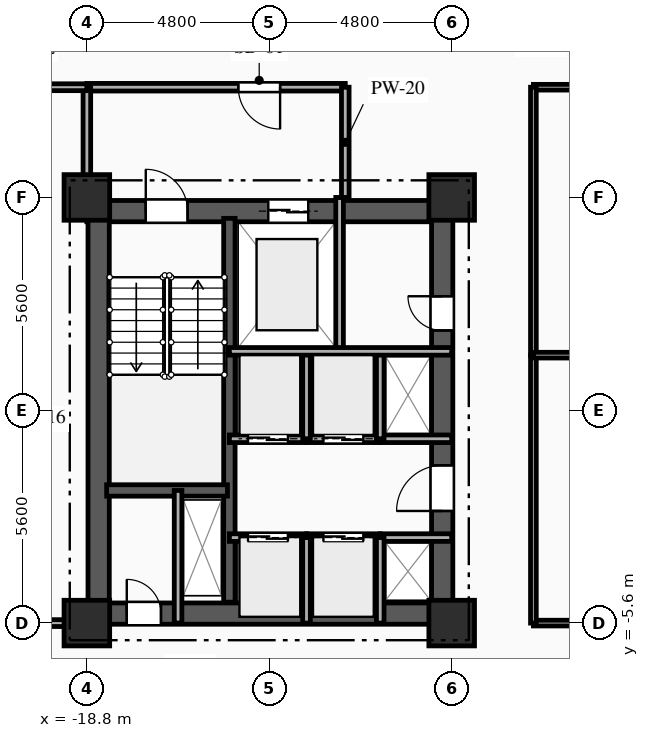
"""IFC4 building model, lengths in metres.
Left out: names, types, materials, properties, quantities, classifications, styles, units other than length and angle.
Written with IfcOpenShell. Run it as: python <this file> out.ifc"""

import sys

from ifc_helpers import new_model, si_unit, direction, frame, frame_2d, origin, origin_2d, place, context, subcontext, project, spatial, rectangle, extrude, element, fill, save


model = new_model("IFC4")
c1 = context("Model", 3, precision=1e-05, world=origin(), true_north=direction((0.0, 1.0)))
c2 = subcontext(c1, "Body", "Model", "MODEL_VIEW")
j1 = project(units=[si_unit("LENGTHUNIT", "METRE"), si_unit("PLANEANGLEUNIT", "RADIAN")], contexts=[c1])
p1 = place(None, origin())
s1 = spatial("IfcSite", under=j1, at=p1, CompositionType="ELEMENT")
p2 = place(p1, origin())
s2 = spatial("IfcBuilding", under=s1, at=p2, CompositionType="ELEMENT")
p3 = place(p2, frame((0.0, 0.0, 37.05)))
s3 = spatial("IfcBuildingStorey", under=s2, at=p3, CompositionType="ELEMENT", Elevation=37.05)
for number, where, z_axis, x_axis in (
    (1, (-18.8, -5.6, 0.0), (0.0, 0.0, 1.0), (1.0, 0.0, 0.0)),
    (2, (-18.8, 5.6, 0.0), (0.0, 0.0, 1.0), (1.0, 0.0, 0.0)),
    (3, (-9.2, -5.6, 0.0), (0.0, 0.0, 1.0), (1.0, 0.0, 0.0)),
    (4, (-9.2, 5.6, 0.0), (0.0, 0.0, 1.0), (1.0, 0.0, 0.0)),
):
    element("IfcColumn", number, at=place(p3, frame(where, z_axis=z_axis, x_axis=x_axis)), inside=s3, PredefinedType="COLUMN", context=c2, shape_type="SweptSolid", body=[
        extrude(rectangle(XDim=1.2, YDim=1.2, at=origin_2d()), origin(), (0.0, 0.0, 1.0), 3.35),
    ])
p4 = place(p3, frame((-18.8, 5.24, 0.0), z_axis=(0.0, 0.0, 1.0), x_axis=(1.0, 0.0, 0.0)))
e5 = element("IfcWall", 5, at=p4, inside=s3, PredefinedType="SHEAR", context=c2, shape_type="SweptSolid", body=[
    extrude(rectangle(XDim=9.6, YDim=0.56, at=frame_2d((4.8, 0.0))), origin(), (0.0, 0.0, 1.0), 3.035),
])
p5 = place(p4, frame((1.55, 0.0, 0.0)))
e6 = element("IfcOpeningElement", 6, at=p5, cuts=e5, PredefinedType="OPENING", context=c2, shape_type="SweptSolid", body=[
    extrude(rectangle(XDim=1.1, YDim=2.15, at=frame_2d((0.55, 1.075))), frame((0.0, 0.29, 0.0), z_axis=(0.0, -1.0, 0.0), x_axis=(1.0, 0.0, 0.0)), (0.0, 0.0, 1.0), 0.58),
])
p6 = place(p4, frame((4.775, 0.0, 0.0)))
e7 = element("IfcOpeningElement", 7, at=p6, cuts=e5, PredefinedType="OPENING", context=c2, shape_type="SweptSolid", body=[
    extrude(rectangle(XDim=1.05, YDim=2.1, at=frame_2d((0.525, 1.05))), frame((0.0, 0.29, 0.0), z_axis=(0.0, -1.0, 0.0), x_axis=(1.0, 0.0, 0.0)), (0.0, 0.0, 1.0), 0.58),
])
p7 = place(p3, frame((-18.8, -5.35, 0.0), z_axis=(0.0, 0.0, 1.0), x_axis=(1.0, 0.0, 0.0)))
e8 = element("IfcWall", 8, at=p7, inside=s3, PredefinedType="SHEAR", context=c2, shape_type="SweptSolid", body=[
    extrude(rectangle(XDim=9.6, YDim=0.56, at=frame_2d((4.8, 0.0))), origin(), (0.0, 0.0, 1.0), 3.035),
])
p8 = place(p7, frame((1.05, 0.0, 0.0)))
e9 = element("IfcOpeningElement", 9, at=p8, cuts=e8, PredefinedType="OPENING", context=c2, shape_type="SweptSolid", body=[
    extrude(rectangle(XDim=0.9, YDim=2.1, at=frame_2d((0.45, 1.05))), frame((0.0, 0.29, 0.0), z_axis=(0.0, -1.0, 0.0), x_axis=(1.0, 0.0, 0.0)), (0.0, 0.0, 1.0), 0.58),
])
p9 = place(p3, frame((-18.49, -5.05, 0.0), z_axis=(0.0, 0.0, 1.0), x_axis=(0.0, 1.0, 0.0)))
e10 = element("IfcWall", 10, at=p9, inside=s3, PredefinedType="SHEAR", context=c2, shape_type="SweptSolid", body=[
    extrude(rectangle(XDim=10.1, YDim=0.56, at=frame_2d((5.05, 0.0))), origin(), (0.0, 0.0, 1.0), 3.035),
])
p10 = place(p3, frame((-9.45, -5.05, 0.0), z_axis=(0.0, 0.0, 1.0), x_axis=(0.0, 1.0, 0.0)))
e11 = element("IfcWall", 11, at=p10, inside=s3, PredefinedType="SHEAR", context=c2, shape_type="SweptSolid", body=[
    extrude(rectangle(XDim=10.1, YDim=0.56, at=frame_2d((5.05, 0.0))), origin(), (0.0, 0.0, 1.0), 3.035),
])
p11 = place(p10, frame((7.15, 0.0, 0.0)))
e12 = element("IfcOpeningElement", 12, at=p11, cuts=e11, PredefinedType="OPENING", context=c2, shape_type="SweptSolid", body=[
    extrude(rectangle(XDim=0.9, YDim=2.1, at=frame_2d((0.45, 1.05))), frame((0.0, 0.29, 0.0), z_axis=(0.0, -1.0, 0.0), x_axis=(1.0, 0.0, 0.0)), (0.0, 0.0, 1.0), 0.58),
])
p12 = place(p10, frame((2.4, 0.0, 0.0)))
e13 = element("IfcOpeningElement", 13, at=p12, cuts=e11, PredefinedType="OPENING", context=c2, shape_type="SweptSolid", body=[
    extrude(rectangle(XDim=1.2, YDim=2.15, at=frame_2d((0.6, 1.075))), frame((0.0, 0.29, 0.0), z_axis=(0.0, -1.0, 0.0), x_axis=(1.0, 0.0, 0.0)), (0.0, 0.0, 1.0), 0.58),
])
p13 = place(p3, frame((-15.05, -5.05, 0.0), z_axis=(0.0, 0.0, 1.0), x_axis=(0.0, 1.0, 0.0)))
e14 = element("IfcWall", 14, at=p13, inside=s3, PredefinedType="SHEAR", context=c2, shape_type="SweptSolid", body=[
    extrude(rectangle(XDim=10.1, YDim=0.3, at=frame_2d((5.05, 0.0))), origin(), (0.0, 0.0, 1.0), 3.035),
])
p14 = place(p3, frame((-18.28, -2.11, 0.0), z_axis=(0.0, 0.0, 1.0), x_axis=(1.0, 0.0, 0.0)))
e15 = element("IfcWall", 15, at=p14, inside=s3, PredefinedType="SHEAR", context=c2, shape_type="SweptSolid", body=[
    extrude(rectangle(XDim=3.18, YDim=0.3, at=frame_2d((1.59, 0.0))), origin(), (0.0, 0.0, 1.0), 3.035),
])
p15 = place(p3, frame((-16.4, -5.6, 0.0), z_axis=(0.0, 0.0, 1.0), x_axis=(0.0, 1.0, 0.0)))
e16 = element("IfcWall", 16, at=p15, inside=s3, PredefinedType="PARTITIONING", context=c2, shape_type="SweptSolid", body=[
    extrude(rectangle(XDim=3.49, YDim=0.2, at=frame_2d((1.745, 0.0))), origin(), (0.0, 0.0, 1.0), 3.035),
])
p16 = place(p3, frame((-12.15, 1.55, 0.0), z_axis=(0.0, 0.0, 1.0), x_axis=(0.0, 1.0, 0.0)))
e17 = element("IfcWall", 17, at=p16, inside=s3, PredefinedType="PARTITIONING", context=c2, shape_type="SweptSolid", body=[
    extrude(rectangle(XDim=4.05, YDim=0.2, at=frame_2d((2.025, 0.0))), origin(), (0.0, 0.0, 1.0), 3.035),
])
p17 = place(p3, frame((-12.0, 8.5, 0.0), z_axis=(0.0, 0.0, 1.0), x_axis=(-1.0, 0.0, 0.0)))
e18 = element("IfcWall", 18, at=p17, inside=s3, PredefinedType="PARTITIONING", context=c2, shape_type="SweptSolid", body=[
    extrude(rectangle(XDim=6.8, YDim=0.2, at=frame_2d((3.4, 0.0))), origin(), (0.0, 0.0, 1.0), 3.035),
])
p18 = place(p17, frame((1.715, 0.0, 0.0)))
e19 = element("IfcOpeningElement", 19, at=p18, cuts=e18, PredefinedType="OPENING", context=c2, shape_type="SweptSolid", body=[
    extrude(rectangle(XDim=1.1, YDim=2.15, at=frame_2d((0.55, 1.075))), frame((0.0, 0.11, 0.0), z_axis=(0.0, -1.0, 0.0), x_axis=(1.0, 0.0, 0.0)), (0.0, 0.0, 1.0), 0.22),
])
p19 = place(p3, frame((-12.0, 5.6, 0.0), z_axis=(0.0, 0.0, 1.0), x_axis=(0.0, 1.0, 0.0)))
e20 = element("IfcWall", 20, at=p19, inside=s3, PredefinedType="PARTITIONING", context=c2, shape_type="SweptSolid", body=[
    extrude(rectangle(XDim=2.9, YDim=0.2, at=frame_2d((1.45, 0.0))), origin(), (0.0, 0.0, 1.0), 3.035),
])
p20 = place(p3, frame((-18.8, 8.5, 0.0), z_axis=(0.0, 0.0, 1.0), x_axis=(0.0, -1.0, 0.0)))
e21 = element("IfcWall", 21, at=p20, inside=s3, PredefinedType="PARTITIONING", context=c2, shape_type="SweptSolid", body=[
    extrude(rectangle(XDim=2.9, YDim=0.2, at=frame_2d((1.45, 0.0))), origin(), (0.0, 0.0, 1.0), 2.52),
])
p21 = place(p3, frame((-15.05, -3.35, 0.0), z_axis=(0.0, 0.0, 1.0), x_axis=(1.0, 0.0, 0.0)))
e22 = element("IfcWall", 22, at=p21, inside=s3, PredefinedType="PARTITIONING", context=c2, shape_type="SweptSolid", body=[
    extrude(rectangle(XDim=2.03, YDim=0.2, at=frame_2d((1.015, 0.0))), origin(), (0.0, 0.0, 1.0), 3.035),
])
p22 = place(p21, frame((0.49, 0.0, 0.0)))
e23 = element("IfcOpeningElement", 23, at=p22, cuts=e22, PredefinedType="OPENING", context=c2, shape_type="SweptSolid", body=[
    extrude(rectangle(XDim=1.05, YDim=2.1, at=frame_2d((0.525, 1.05))), frame((0.0, 0.11, 0.0), z_axis=(0.0, -1.0, 0.0), x_axis=(1.0, 0.0, 0.0)), (0.0, 0.0, 1.0), 0.22),
])
p23 = place(p3, frame((-13.02, -3.35, 0.0), z_axis=(0.0, 0.0, 1.0), x_axis=(1.0, 0.0, 0.0)))
e24 = element("IfcWall", 24, at=p23, inside=s3, PredefinedType="PARTITIONING", context=c2, shape_type="SweptSolid", body=[
    extrude(rectangle(XDim=1.94, YDim=0.2, at=frame_2d((0.97, 0.0))), origin(), (0.0, 0.0, 1.0), 3.035),
])
p24 = place(p23, frame((0.445, 0.0, 0.0)))
e25 = element("IfcOpeningElement", 25, at=p24, cuts=e24, PredefinedType="OPENING", context=c2, shape_type="SweptSolid", body=[
    extrude(rectangle(XDim=1.05, YDim=2.1, at=frame_2d((0.525, 1.05))), frame((0.0, 0.11, 0.0), z_axis=(0.0, -1.0, 0.0), x_axis=(1.0, 0.0, 0.0)), (0.0, 0.0, 1.0), 0.22),
])
p25 = place(p3, frame((-11.08, -3.35, 0.0), z_axis=(0.0, 0.0, 1.0), x_axis=(1.0, 0.0, 0.0)))
e26 = element("IfcWall", 26, at=p25, inside=s3, PredefinedType="PARTITIONING", context=c2, shape_type="SweptSolid", body=[
    extrude(rectangle(XDim=1.88, YDim=0.2, at=frame_2d((0.94, 0.0))), origin(), (0.0, 0.0, 1.0), 2.75),
])
p26 = place(p3, frame((-13.02, -0.75, 0.0), z_axis=(0.0, 0.0, 1.0), x_axis=(-1.0, 0.0, 0.0)))
e27 = element("IfcWall", 27, at=p26, inside=s3, PredefinedType="PARTITIONING", context=c2, shape_type="SweptSolid", body=[
    extrude(rectangle(XDim=2.03, YDim=0.2, at=frame_2d((1.015, 0.0))), origin(), (0.0, 0.0, 1.0), 3.035),
])
p27 = place(p26, frame((0.49, 0.0, 0.0)))
e28 = element("IfcOpeningElement", 28, at=p27, cuts=e27, PredefinedType="OPENING", context=c2, shape_type="SweptSolid", body=[
    extrude(rectangle(XDim=1.05, YDim=2.1, at=frame_2d((0.525, 1.05))), frame((0.0, 0.11, 0.0), z_axis=(0.0, -1.0, 0.0), x_axis=(1.0, 0.0, 0.0)), (0.0, 0.0, 1.0), 0.22),
])
p28 = place(p3, frame((-11.08, -0.75, 0.0), z_axis=(0.0, 0.0, 1.0), x_axis=(-1.0, 0.0, 0.0)))
e29 = element("IfcWall", 29, at=p28, inside=s3, PredefinedType="PARTITIONING", context=c2, shape_type="SweptSolid", body=[
    extrude(rectangle(XDim=1.94, YDim=0.2, at=frame_2d((0.97, 0.0))), origin(), (0.0, 0.0, 1.0), 3.035),
])
p29 = place(p28, frame((0.445, 0.0, 0.0)))
e30 = element("IfcOpeningElement", 30, at=p29, cuts=e29, PredefinedType="OPENING", context=c2, shape_type="SweptSolid", body=[
    extrude(rectangle(XDim=1.05, YDim=2.1, at=frame_2d((0.525, 1.05))), frame((0.0, 0.11, 0.0), z_axis=(0.0, -1.0, 0.0), x_axis=(1.0, 0.0, 0.0)), (0.0, 0.0, 1.0), 0.22),
])
p30 = place(p3, frame((-9.2, -0.75, 0.0), z_axis=(0.0, 0.0, 1.0), x_axis=(-1.0, 0.0, 0.0)))
e31 = element("IfcWall", 31, at=p30, inside=s3, PredefinedType="PARTITIONING", context=c2, shape_type="SweptSolid", body=[
    extrude(rectangle(XDim=1.88, YDim=0.2, at=frame_2d((0.94, 0.0))), origin(), (0.0, 0.0, 1.0), 3.035),
])
for number, where, z_axis, x_axis in (
    (32, (-13.02, -5.6, 0.0), (0.0, 0.0, 1.0), (0.0, 1.0, 0.0)),
    (33, (-11.08, -5.6, 0.0), (0.0, 0.0, 1.0), (0.0, 1.0, 0.0)),
):
    element("IfcWall", number, at=place(p3, frame(where, z_axis=z_axis, x_axis=x_axis)), inside=s3, PredefinedType="PARTITIONING", context=c2, shape_type="SweptSolid", body=[
        extrude(rectangle(XDim=2.25, YDim=0.2, at=frame_2d((1.125, 0.0))), origin(), (0.0, 0.0, 1.0), 3.035),
    ])
for number, where, z_axis, x_axis in (
    (34, (-13.02, -0.75, 0.0), (0.0, 0.0, 1.0), (0.0, 1.0, 0.0)),
    (35, (-11.08, -0.75, 0.0), (0.0, 0.0, 1.0), (0.0, 1.0, 0.0)),
):
    element("IfcWall", number, at=place(p3, frame(where, z_axis=z_axis, x_axis=x_axis)), inside=s3, PredefinedType="PARTITIONING", context=c2, shape_type="SweptSolid", body=[
        extrude(rectangle(XDim=2.3, YDim=0.2, at=frame_2d((1.15, 0.0))), origin(), (0.0, 0.0, 1.0), 3.035),
    ])
p31 = place(p3, frame((-18.8, 8.5, 0.0), z_axis=(0.0, 0.0, 1.0), x_axis=(-1.0, 0.0, 0.0)))
e36 = element("IfcWall", 36, at=p31, inside=s3, PredefinedType="PARTITIONING", context=c2, shape_type="SweptSolid", body=[
    extrude(rectangle(XDim=2.65, YDim=0.18, at=frame_2d((1.325, 0.0))), origin(), (0.0, 0.0, 1.0), 3.035),
])
p32 = place(p31, frame((1.009, 0.0, 0.0)))
e37 = element("IfcOpeningElement", 37, at=p32, cuts=e36, PredefinedType="OPENING", context=c2, shape_type="SweptSolid", body=[
    extrude(rectangle(XDim=1.0, YDim=2.15, at=frame_2d((0.5, 1.075))), frame((0.0, 0.1, 0.0), z_axis=(0.0, -1.0, 0.0), x_axis=(1.0, 0.0, 0.0)), (0.0, 0.0, 1.0), 0.2),
])
p33 = place(p3, frame((0.0, 8.5, 0.0), z_axis=(0.0, 0.0, 1.0), x_axis=(-1.0, 0.0, 0.0)))
e38 = element("IfcWall", 38, at=p33, inside=s3, PredefinedType="PARTITIONING", context=c2, shape_type="SweptSolid", body=[
    extrude(rectangle(XDim=7.05, YDim=0.15, at=frame_2d((3.525, 0.0))), origin(), (0.0, 0.0, 1.0), 3.035),
])
p34 = place(p33, frame((1.185, 0.0, 0.0)))
e39 = element("IfcOpeningElement", 39, at=p34, cuts=e38, PredefinedType="OPENING", context=c2, shape_type="SweptSolid", body=[
    extrude(rectangle(XDim=1.05, YDim=2.15, at=frame_2d((0.525, 1.075))), frame((0.0, 0.085, 0.0), z_axis=(0.0, -1.0, 0.0), x_axis=(1.0, 0.0, 0.0)), (0.0, 0.0, 1.0), 0.17),
])
p35 = place(p3, frame((-21.45, -5.6, 0.0), z_axis=(0.0, 0.0, 1.0), x_axis=(1.0, 0.0, 0.0)))
e40 = element("IfcWall", 40, at=p35, inside=s3, PredefinedType="PARTITIONING", context=c2, shape_type="SweptSolid", body=[
    extrude(rectangle(XDim=2.65, YDim=0.18, at=frame_2d((1.325, 0.0))), origin(), (0.0, 0.0, 1.0), 3.035),
])
p36 = place(p3, frame((-7.05, -5.6, 0.0), z_axis=(0.0, 0.0, 1.0), x_axis=(1.0, 0.0, 0.0)))
e41 = element("IfcWall", 41, at=p36, inside=s3, PredefinedType="PARTITIONING", context=c2, shape_type="SweptSolid", body=[
    extrude(rectangle(XDim=7.05, YDim=0.15, at=frame_2d((3.525, 0.0))), origin(), (0.0, 0.0, 1.0), 2.52),
])
p37 = place(p36, frame((4.815, 0.0, 0.0)))
e42 = element("IfcOpeningElement", 42, at=p37, cuts=e41, PredefinedType="OPENING", context=c2, shape_type="SweptSolid", body=[
    extrude(rectangle(XDim=1.05, YDim=2.15, at=frame_2d((0.525, 1.075))), frame((0.0, 0.085, 0.0), z_axis=(0.0, -1.0, 0.0), x_axis=(1.0, 0.0, 0.0)), (0.0, 0.0, 1.0), 0.17),
])
for number, where, z_axis, x_axis in (
    (43, (-7.05, 1.45, 0.0), (0.0, 0.0, 1.0), (0.0, -1.0, 0.0)),
    (44, (-7.05, 8.5, 0.0), (0.0, 0.0, 1.0), (0.0, -1.0, 0.0)),
):
    element("IfcWall", number, at=place(p3, frame(where, z_axis=z_axis, x_axis=x_axis)), inside=s3, PredefinedType="PARTITIONING", context=c2, shape_type="SweptSolid", body=[
        extrude(rectangle(XDim=7.05, YDim=0.15, at=frame_2d((3.525, 0.0))), origin(), (0.0, 0.0, 1.0), 3.035),
    ])
p38 = place(p3, frame((-7.05, 1.45, 0.0), z_axis=(0.0, 0.0, 1.0), x_axis=(1.0, 0.0, 0.0)))
e45 = element("IfcWall", 45, at=p38, inside=s3, PredefinedType="PARTITIONING", context=c2, shape_type="SweptSolid", body=[
    extrude(rectangle(XDim=14.1, YDim=0.15, at=frame_2d((7.05, 0.0))), origin(), (0.0, 0.0, 1.0), 3.035),
])
p39 = place(p3, frame((-15.05, 1.55, 0.0), z_axis=(0.0, 0.0, 1.0), x_axis=(1.0, 0.0, 0.0)))
e46 = element("IfcWall", 46, at=p39, inside=s3, PredefinedType="PARTITIONING", context=c2, shape_type="SweptSolid", body=[
    extrude(rectangle(XDim=5.85, YDim=0.2, at=frame_2d((2.925, 0.0))), origin(), (0.0, 0.0, 1.0), 3.035),
])
p40 = place(p5, origin())
e47 = element("IfcDoor", 47, at=p40, inside=s3, OperationType="SINGLE_SWING_LEFT", PredefinedType="DOOR", context=c2, shape_type="SweptSolid", body=[
    extrude(rectangle(XDim=1.1, YDim=2.15, at=frame_2d((0.55, 1.075))), frame((0.0, 0.025, 0.0), z_axis=(0.0, -1.0, 0.0), x_axis=(1.0, 0.0, 0.0)), (0.0, 0.0, 1.0), 0.05),
])
fill(e6, e47)
p41 = place(p6, origin())
e48 = element("IfcDoor", 48, at=p41, inside=s3, OperationType="DOUBLE_DOOR_SLIDING", PredefinedType="DOOR", context=c2, shape_type="SweptSolid", body=[
    extrude(rectangle(XDim=1.05, YDim=2.1, at=frame_2d((0.525, 1.05))), frame((0.0, 0.025, 0.0), z_axis=(0.0, -1.0, 0.0), x_axis=(1.0, 0.0, 0.0)), (0.0, 0.0, 1.0), 0.05),
])
fill(e7, e48)
p42 = place(p8, origin())
e49 = element("IfcDoor", 49, at=p42, inside=s3, OperationType="SINGLE_SWING_LEFT", PredefinedType="DOOR", context=c2, shape_type="SweptSolid", body=[
    extrude(rectangle(XDim=0.9, YDim=2.1, at=frame_2d((0.45, 1.05))), frame((0.0, 0.025, 0.0), z_axis=(0.0, -1.0, 0.0), x_axis=(1.0, 0.0, 0.0)), (0.0, 0.0, 1.0), 0.05),
])
fill(e9, e49)
p43 = place(p18, origin())
e50 = element("IfcDoor", 50, at=p43, inside=s3, OperationType="SINGLE_SWING_LEFT", PredefinedType="DOOR", context=c2, shape_type="SweptSolid", body=[
    extrude(rectangle(XDim=1.1, YDim=2.15, at=frame_2d((0.55, 1.075))), frame((0.0, 0.025, 0.0), z_axis=(0.0, -1.0, 0.0), x_axis=(1.0, 0.0, 0.0)), (0.0, 0.0, 1.0), 0.05),
])
fill(e19, e50)
p44 = place(p11, origin())
e51 = element("IfcDoor", 51, at=p44, inside=s3, OperationType="SINGLE_SWING_RIGHT", PredefinedType="DOOR", context=c2, shape_type="SweptSolid", body=[
    extrude(rectangle(XDim=0.9, YDim=2.1, at=frame_2d((0.45, 1.05))), frame((0.0, 0.025, 0.0), z_axis=(0.0, -1.0, 0.0), x_axis=(1.0, 0.0, 0.0)), (0.0, 0.0, 1.0), 0.05),
])
fill(e12, e51)
p45 = place(p22, origin())
e52 = element("IfcDoor", 52, at=p45, inside=s3, OperationType="DOUBLE_DOOR_SLIDING", PredefinedType="DOOR", context=c2, shape_type="SweptSolid", body=[
    extrude(rectangle(XDim=1.05, YDim=2.1, at=frame_2d((0.525, 1.05))), frame((0.0, 0.025, 0.0), z_axis=(0.0, -1.0, 0.0), x_axis=(1.0, 0.0, 0.0)), (0.0, 0.0, 1.0), 0.05),
])
fill(e23, e52)
p46 = place(p24, origin())
e53 = element("IfcDoor", 53, at=p46, inside=s3, OperationType="DOUBLE_DOOR_SLIDING", PredefinedType="DOOR", context=c2, shape_type="SweptSolid", body=[
    extrude(rectangle(XDim=1.05, YDim=2.1, at=frame_2d((0.525, 1.05))), frame((0.0, 0.025, 0.0), z_axis=(0.0, -1.0, 0.0), x_axis=(1.0, 0.0, 0.0)), (0.0, 0.0, 1.0), 0.05),
])
fill(e25, e53)
p47 = place(p27, origin())
e54 = element("IfcDoor", 54, at=p47, inside=s3, OperationType="DOUBLE_DOOR_SLIDING", PredefinedType="DOOR", context=c2, shape_type="SweptSolid", body=[
    extrude(rectangle(XDim=1.05, YDim=2.1, at=frame_2d((0.525, 1.05))), frame((0.0, 0.025, 0.0), z_axis=(0.0, -1.0, 0.0), x_axis=(1.0, 0.0, 0.0)), (0.0, 0.0, 1.0), 0.05),
])
fill(e28, e54)
p48 = place(p29, origin())
e55 = element("IfcDoor", 55, at=p48, inside=s3, OperationType="DOUBLE_DOOR_SLIDING", PredefinedType="DOOR", context=c2, shape_type="SweptSolid", body=[
    extrude(rectangle(XDim=1.05, YDim=2.1, at=frame_2d((0.525, 1.05))), frame((0.0, 0.025, 0.0), z_axis=(0.0, -1.0, 0.0), x_axis=(1.0, 0.0, 0.0)), (0.0, 0.0, 1.0), 0.05),
])
fill(e30, e55)
p49 = place(p12, origin())
e56 = element("IfcDoor", 56, at=p49, inside=s3, OperationType="SINGLE_SWING_LEFT", PredefinedType="DOOR", context=c2, shape_type="SweptSolid", body=[
    extrude(rectangle(XDim=1.2, YDim=2.15, at=frame_2d((0.6, 1.075))), frame((0.0, 0.025, 0.0), z_axis=(0.0, -1.0, 0.0), x_axis=(1.0, 0.0, 0.0)), (0.0, 0.0, 1.0), 0.05),
])
fill(e13, e56)
save(model, sys.argv[1])
